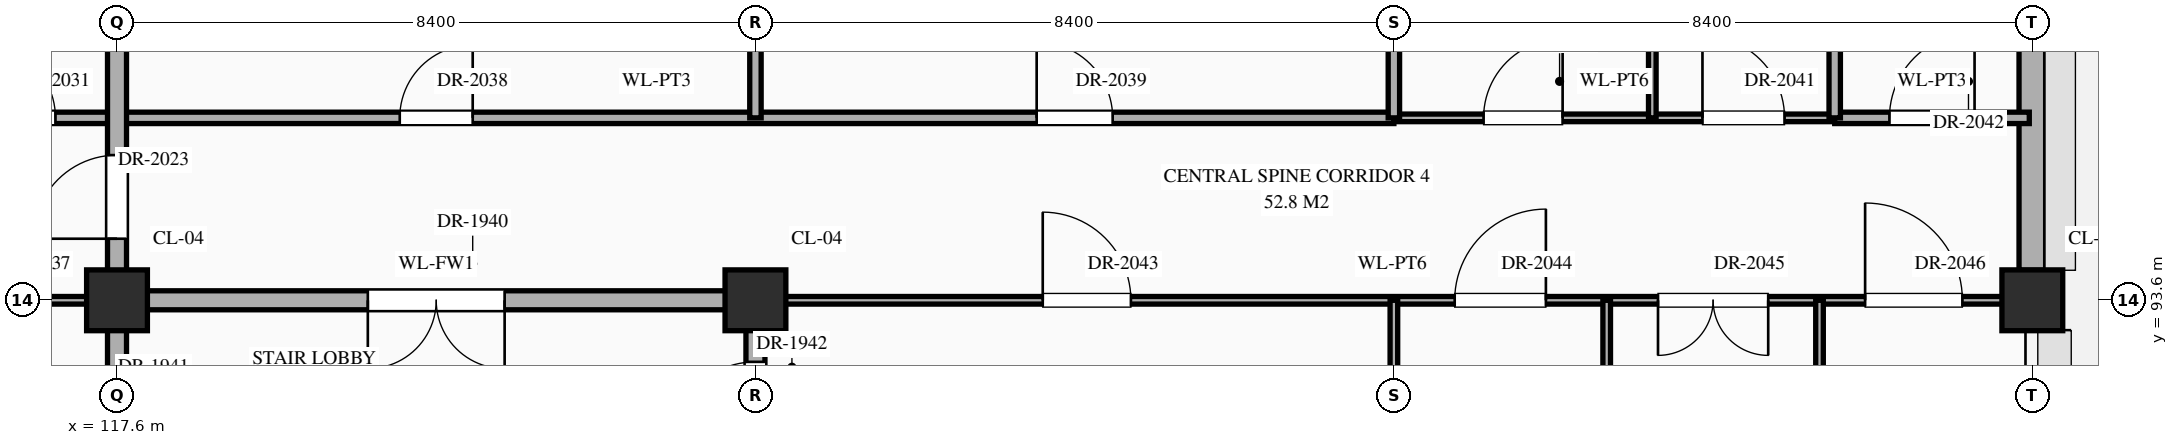
"""IFC4 building model, lengths in metres.
Left out: names, types, materials, properties, quantities, classifications, styles, units other than length and angle.
Written with IfcOpenShell. Run it as: python <this file> out.ifc"""

import sys

from ifc_helpers import new_model, si_unit, direction, frame, frame_2d, origin, origin_2d, place, context, subcontext, project, spatial, rectangle, extrude, element, fill, save


model = new_model("IFC4")
c1 = context("Model", 3, precision=1e-05, world=origin(), true_north=direction((0.0, 1.0)))
c2 = subcontext(c1, "Body", "Model", "MODEL_VIEW")
j1 = project(units=[si_unit("LENGTHUNIT", "METRE"), si_unit("PLANEANGLEUNIT", "RADIAN")], contexts=[c1])
p1 = place(None, origin())
s1 = spatial("IfcSite", under=j1, at=p1, CompositionType="ELEMENT")
p2 = place(p1, origin())
s2 = spatial("IfcBuilding", under=s1, at=p2, CompositionType="ELEMENT")
p3 = place(p2, frame((0.0, 0.0, 21.6)))
s3 = spatial("IfcBuildingStorey", under=s2, at=p3, CompositionType="ELEMENT", Elevation=21.6)
for number, where, z_axis, x_axis in (
    (1, (117.6, 93.6, 0.0), (0.0, 0.0, 1.0), (1.0, 0.0, 0.0)),
    (2, (126.0, 93.6, 0.0), (0.0, 0.0, 1.0), (1.0, 0.0, 0.0)),
    (3, (142.8, 93.6, 0.0), (0.0, 0.0, 1.0), (1.0, 0.0, 0.0)),
):
    element("IfcColumn", number, at=place(p3, frame(where, z_axis=z_axis, x_axis=x_axis)), inside=s3, PredefinedType="COLUMN", context=c2, shape_type="SweptSolid", body=[
        extrude(rectangle(XDim=0.8, YDim=0.8, at=origin_2d()), origin(), (0.0, 0.0, 1.0), 4.5),
    ])
p4 = place(p3, frame((142.8, 93.995, 0.0), z_axis=(0.0, 0.0, 1.0), x_axis=(0.0, 1.0, 0.0)))
e4 = element("IfcWall", 4, at=p4, inside=s3, PredefinedType="STANDARD", context=c2, shape_type="SweptSolid", body=[
    extrude(rectangle(XDim=6.41, YDim=0.35, at=frame_2d((3.205, 0.0))), origin(), (0.0, 0.0, 1.0), 3.59),
])
p5 = place(p4, frame((3.73, 0.0, 0.85)))
e5 = element("IfcOpeningElement", 5, at=p5, cuts=e4, PredefinedType="OPENING", context=c2, shape_type="SweptSolid", body=[
    extrude(rectangle(XDim=1.55, YDim=1.38, at=frame_2d((0.775, 0.69))), frame((0.0, 0.187, 0.0), z_axis=(0.0, -1.0, 0.0), x_axis=(1.0, 0.0, 0.0)), (0.0, 0.0, 1.0), 0.374),
])
p6 = place(p3, frame((109.2, 93.6, 0.0), z_axis=(0.0, 0.0, 1.0), x_axis=(1.0, 0.0, 0.0)))
e6 = element("IfcWall", 6, at=p6, inside=s3, PredefinedType="STANDARD", context=c2, shape_type="SweptSolid", body=[
    extrude(rectangle(XDim=8.4, YDim=0.1, at=frame_2d((4.2, 0.0))), origin(), (0.0, 0.0, 1.0), 3.39),
])
p7 = place(p6, frame((1.11, 0.0, 0.0)))
e7 = element("IfcOpeningElement", 7, at=p7, cuts=e6, PredefinedType="OPENING", context=c2, shape_type="SweptSolid", body=[
    extrude(rectangle(XDim=0.9, YDim=2.15, at=frame_2d((0.45, 1.075))), frame((0.0, 0.062, 0.0), z_axis=(0.0, -1.0, 0.0), x_axis=(1.0, 0.0, 0.0)), (0.0, 0.0, 1.0), 0.124),
])
p8 = place(p6, frame((3.77, 0.0, 0.0)))
e8 = element("IfcOpeningElement", 8, at=p8, cuts=e6, PredefinedType="OPENING", context=c2, shape_type="SweptSolid", body=[
    extrude(rectangle(XDim=0.86, YDim=2.1, at=frame_2d((0.43, 1.05))), frame((0.0, 0.062, 0.0), z_axis=(0.0, -1.0, 0.0), x_axis=(1.0, 0.0, 0.0)), (0.0, 0.0, 1.0), 0.124),
])
p9 = place(p6, frame((6.38, 0.0, 0.0)))
e9 = element("IfcOpeningElement", 9, at=p9, cuts=e6, PredefinedType="OPENING", context=c2, shape_type="SweptSolid", body=[
    extrude(rectangle(XDim=0.92, YDim=2.15, at=frame_2d((0.46, 1.075))), frame((0.0, 0.062, 0.0), z_axis=(0.0, -1.0, 0.0), x_axis=(1.0, 0.0, 0.0)), (0.0, 0.0, 1.0), 0.124),
])
p10 = place(p3, frame((117.6, 93.6, 0.0), z_axis=(0.0, 0.0, 1.0), x_axis=(1.0, 0.0, 0.0)))
e10 = element("IfcWall", 10, at=p10, inside=s3, PredefinedType="STANDARD", context=c2, shape_type="SweptSolid", body=[
    extrude(rectangle(XDim=8.4, YDim=0.25, at=frame_2d((4.2, 0.0))), origin(), (0.0, 0.0, 1.0), 3.39),
])
p11 = place(p10, frame((3.3, 0.0, 0.0)))
e11 = element("IfcOpeningElement", 11, at=p11, cuts=e10, PredefinedType="OPENING", context=c2, shape_type="SweptSolid", body=[
    extrude(rectangle(XDim=1.8, YDim=2.35, at=frame_2d((0.9, 1.175))), frame((0.0, 0.137, 0.0), z_axis=(0.0, -1.0, 0.0), x_axis=(1.0, 0.0, 0.0)), (0.0, 0.0, 1.0), 0.274),
])
p12 = place(p3, frame((126.0, 93.6, 0.0), z_axis=(0.0, 0.0, 1.0), x_axis=(1.0, 0.0, 0.0)))
e12 = element("IfcWall", 12, at=p12, inside=s3, PredefinedType="STANDARD", context=c2, shape_type="SweptSolid", body=[
    extrude(rectangle(XDim=16.76, YDim=0.1, at=frame_2d((8.38, 0.0))), origin(), (0.0, 0.0, 1.0), 3.19),
])
p13 = place(p12, frame((3.78, 0.0, 0.0)))
e13 = element("IfcOpeningElement", 13, at=p13, cuts=e12, PredefinedType="OPENING", context=c2, shape_type="SweptSolid", body=[
    extrude(rectangle(XDim=1.16, YDim=2.3, at=frame_2d((0.58, 1.15))), frame((0.0, 0.062, 0.0), z_axis=(0.0, -1.0, 0.0), x_axis=(1.0, 0.0, 0.0)), (0.0, 0.0, 1.0), 0.124),
])
p14 = place(p12, frame((9.2, 0.0, 0.0)))
e14 = element("IfcOpeningElement", 14, at=p14, cuts=e12, PredefinedType="OPENING", context=c2, shape_type="SweptSolid", body=[
    extrude(rectangle(XDim=1.2, YDim=2.35, at=frame_2d((0.6, 1.175))), frame((0.0, 0.062, 0.0), z_axis=(0.0, -1.0, 0.0), x_axis=(1.0, 0.0, 0.0)), (0.0, 0.0, 1.0), 0.124),
])
p15 = place(p12, frame((11.875, 0.0, 0.0)))
e15 = element("IfcOpeningElement", 15, at=p15, cuts=e12, PredefinedType="OPENING", context=c2, shape_type="SweptSolid", body=[
    extrude(rectangle(XDim=1.45, YDim=2.3, at=frame_2d((0.725, 1.15))), frame((0.0, 0.062, 0.0), z_axis=(0.0, -1.0, 0.0), x_axis=(1.0, 0.0, 0.0)), (0.0, 0.0, 1.0), 0.124),
])
p16 = place(p12, frame((14.6, 0.0, 0.0)))
e16 = element("IfcOpeningElement", 16, at=p16, cuts=e12, PredefinedType="OPENING", context=c2, shape_type="SweptSolid", body=[
    extrude(rectangle(XDim=1.28, YDim=2.35, at=frame_2d((0.64, 1.175))), frame((0.0, 0.062, 0.0), z_axis=(0.0, -1.0, 0.0), x_axis=(1.0, 0.0, 0.0)), (0.0, 0.0, 1.0), 0.124),
])
p17 = place(p3, frame((115.0, 96.0, 0.0), z_axis=(0.0, 0.0, 1.0), x_axis=(1.0, 0.0, 0.0)))
e17 = element("IfcWall", 17, at=p17, inside=s3, PredefinedType="STANDARD", context=c2, shape_type="SweptSolid", body=[
    extrude(rectangle(XDim=19.4, YDim=0.15, at=frame_2d((9.7, 0.0))), origin(), (0.0, 0.0, 1.0), 4.24),
])
p18 = place(p17, frame((0.81, 0.0, 0.0)))
e18 = element("IfcOpeningElement", 18, at=p18, cuts=e17, PredefinedType="OPENING", context=c2, shape_type="SweptSolid", body=[
    extrude(rectangle(XDim=0.98, YDim=2.35, at=frame_2d((0.49, 1.175))), frame((0.0, 0.087, 0.0), z_axis=(0.0, -1.0, 0.0), x_axis=(1.0, 0.0, 0.0)), (0.0, 0.0, 1.0), 0.174),
])
p19 = place(p17, frame((6.32, 0.0, 0.0)))
e19 = element("IfcOpeningElement", 19, at=p19, cuts=e17, PredefinedType="OPENING", context=c2, shape_type="SweptSolid", body=[
    extrude(rectangle(XDim=0.96, YDim=2.2, at=frame_2d((0.48, 1.1))), frame((0.0, 0.087, 0.0), z_axis=(0.0, -1.0, 0.0), x_axis=(1.0, 0.0, 0.0)), (0.0, 0.0, 1.0), 0.174),
])
p20 = place(p17, frame((14.7, 0.0, 0.0)))
e20 = element("IfcOpeningElement", 20, at=p20, cuts=e17, PredefinedType="OPENING", context=c2, shape_type="SweptSolid", body=[
    extrude(rectangle(XDim=1.0, YDim=2.25, at=frame_2d((0.5, 1.125))), frame((0.0, 0.087, 0.0), z_axis=(0.0, -1.0, 0.0), x_axis=(1.0, 0.0, 0.0)), (0.0, 0.0, 1.0), 0.174),
])
p21 = place(p3, frame((134.4, 96.0, 0.0), z_axis=(0.0, 0.0, 1.0), x_axis=(1.0, 0.0, 0.0)))
e21 = element("IfcWall", 21, at=p21, inside=s3, PredefinedType="STANDARD", context=c2, shape_type="SweptSolid", body=[
    extrude(rectangle(XDim=5.8, YDim=0.1, at=frame_2d((2.9, 0.0))), origin(), (0.0, 0.0, 1.0), 4.24),
])
p22 = place(p21, frame((1.18, 0.0, 0.0)))
e22 = element("IfcOpeningElement", 22, at=p22, cuts=e21, PredefinedType="OPENING", context=c2, shape_type="SweptSolid", body=[
    extrude(rectangle(XDim=1.04, YDim=2.2, at=frame_2d((0.52, 1.1))), frame((0.0, 0.062, 0.0), z_axis=(0.0, -1.0, 0.0), x_axis=(1.0, 0.0, 0.0)), (0.0, 0.0, 1.0), 0.124),
])
p23 = place(p21, frame((4.06, 0.0, 0.0)))
e23 = element("IfcOpeningElement", 23, at=p23, cuts=e21, PredefinedType="OPENING", context=c2, shape_type="SweptSolid", body=[
    extrude(rectangle(XDim=1.08, YDim=2.25, at=frame_2d((0.54, 1.125))), frame((0.0, 0.062, 0.0), z_axis=(0.0, -1.0, 0.0), x_axis=(1.0, 0.0, 0.0)), (0.0, 0.0, 1.0), 0.124),
])
p24 = place(p3, frame((140.2, 96.0, 0.0), z_axis=(0.0, 0.0, 1.0), x_axis=(1.0, 0.0, 0.0)))
e24 = element("IfcWall", 24, at=p24, inside=s3, PredefinedType="STANDARD", context=c2, shape_type="SweptSolid", body=[
    extrude(rectangle(XDim=2.56, YDim=0.15, at=frame_2d((1.28, 0.0))), origin(), (0.0, 0.0, 1.0), 4.24),
])
p25 = place(p24, frame((0.72, 0.0, 0.0)))
e25 = element("IfcOpeningElement", 25, at=p25, cuts=e24, PredefinedType="OPENING", context=c2, shape_type="SweptSolid", body=[
    extrude(rectangle(XDim=1.12, YDim=2.25, at=frame_2d((0.56, 1.125))), frame((0.0, 0.087, 0.0), z_axis=(0.0, -1.0, 0.0), x_axis=(1.0, 0.0, 0.0)), (0.0, 0.0, 1.0), 0.174),
])
p26 = place(p3, frame((117.6, 91.2, 0.0), z_axis=(0.0, 0.0, 1.0), x_axis=(0.0, 1.0, 0.0)))
e26 = element("IfcWall", 26, at=p26, inside=s3, PredefinedType="STANDARD", context=c2, shape_type="SweptSolid", body=[
    extrude(rectangle(XDim=13.2, YDim=0.25, at=frame_2d((6.6, 0.0))), origin(), (0.0, 0.0, 1.0), 3.49),
])
p27 = place(p26, frame((0.565, 0.0, 0.0)))
e27 = element("IfcOpeningElement", 27, at=p27, cuts=e26, PredefinedType="OPENING", context=c2, shape_type="SweptSolid", body=[
    extrude(rectangle(XDim=0.95, YDim=2.15, at=frame_2d((0.475, 1.075))), frame((0.0, 0.137, 0.0), z_axis=(0.0, -1.0, 0.0), x_axis=(1.0, 0.0, 0.0)), (0.0, 0.0, 1.0), 0.274),
])
p28 = place(p26, frame((10.41, 0.0, 0.0)))
e28 = element("IfcOpeningElement", 28, at=p28, cuts=e26, PredefinedType="OPENING", context=c2, shape_type="SweptSolid", body=[
    extrude(rectangle(XDim=1.1, YDim=2.2, at=frame_2d((0.55, 1.1))), frame((0.0, 0.137, 0.0), z_axis=(0.0, -1.0, 0.0), x_axis=(1.0, 0.0, 0.0)), (0.0, 0.0, 1.0), 0.274),
])
p29 = place(p26, frame((3.21, 0.0, 0.0)))
e29 = element("IfcOpeningElement", 29, at=p29, cuts=e26, PredefinedType="OPENING", context=c2, shape_type="SweptSolid", body=[
    extrude(rectangle(XDim=1.1, YDim=2.2, at=frame_2d((0.55, 1.1))), frame((0.0, 0.137, 0.0), z_axis=(0.0, -1.0, 0.0), x_axis=(1.0, 0.0, 0.0)), (0.0, 0.0, 1.0), 0.274),
])
p30 = place(p3, frame((126.0, 91.2, 0.0), z_axis=(0.0, 0.0, 1.0), x_axis=(0.0, 1.0, 0.0)))
e30 = element("IfcWall", 30, at=p30, inside=s3, PredefinedType="STANDARD", context=c2, shape_type="SweptSolid", body=[
    extrude(rectangle(XDim=2.4, YDim=0.25, at=frame_2d((1.2, 0.0))), origin(), (0.0, 0.0, 1.0), 3.49),
])
p31 = place(p30, frame((0.49, 0.0, 0.0)))
e31 = element("IfcOpeningElement", 31, at=p31, cuts=e30, PredefinedType="OPENING", context=c2, shape_type="SweptSolid", body=[
    extrude(rectangle(XDim=1.1, YDim=2.2, at=frame_2d((0.55, 1.1))), frame((0.0, 0.137, 0.0), z_axis=(0.0, -1.0, 0.0), x_axis=(1.0, 0.0, 0.0)), (0.0, 0.0, 1.0), 0.274),
])
p32 = place(p3, frame((126.0, 96.0, 0.0), z_axis=(0.0, 0.0, 1.0), x_axis=(0.0, 1.0, 0.0)))
e32 = element("IfcWall", 32, at=p32, inside=s3, PredefinedType="STANDARD", context=c2, shape_type="SweptSolid", body=[
    extrude(rectangle(XDim=4.8, YDim=0.15, at=frame_2d((2.4, 0.0))), origin(), (0.0, 0.0, 1.0), 3.49),
])
p33 = place(p3, frame((134.4, 86.4, 0.0), z_axis=(0.0, 0.0, 1.0), x_axis=(0.0, 1.0, 0.0)))
e33 = element("IfcWall", 33, at=p33, inside=s3, PredefinedType="STANDARD", context=c2, shape_type="SweptSolid", body=[
    extrude(rectangle(XDim=7.2, YDim=0.1, at=frame_2d((3.6, 0.0))), origin(), (0.0, 0.0, 1.0), 4.24),
])
p34 = place(p3, frame((134.4, 96.0, 0.0), z_axis=(0.0, 0.0, 1.0), x_axis=(0.0, 1.0, 0.0)))
e34 = element("IfcWall", 34, at=p34, inside=s3, PredefinedType="STANDARD", context=c2, shape_type="SweptSolid", body=[
    extrude(rectangle(XDim=4.8, YDim=0.15, at=frame_2d((2.4, 0.0))), origin(), (0.0, 0.0, 1.0), 4.24),
])
p35 = place(p3, frame((137.2, 86.4, 0.0), z_axis=(0.0, 0.0, 1.0), x_axis=(0.0, 1.0, 0.0)))
e35 = element("IfcWall", 35, at=p35, inside=s3, PredefinedType="STANDARD", context=c2, shape_type="SweptSolid", body=[
    extrude(rectangle(XDim=7.2, YDim=0.1, at=frame_2d((3.6, 0.0))), origin(), (0.0, 0.0, 1.0), 4.24),
])
p36 = place(p35, frame((2.98, 0.0, 0.0)))
e36 = element("IfcOpeningElement", 36, at=p36, cuts=e35, PredefinedType="OPENING", context=c2, shape_type="SweptSolid", body=[
    extrude(rectangle(XDim=1.24, YDim=2.3, at=frame_2d((0.62, 1.15))), frame((0.0, 0.062, 0.0), z_axis=(0.0, -1.0, 0.0), x_axis=(1.0, 0.0, 0.0)), (0.0, 0.0, 1.0), 0.124),
])
p37 = place(p3, frame((137.8, 96.0, 0.0), z_axis=(0.0, 0.0, 1.0), x_axis=(0.0, 1.0, 0.0)))
e37 = element("IfcWall", 37, at=p37, inside=s3, PredefinedType="STANDARD", context=c2, shape_type="SweptSolid", body=[
    extrude(rectangle(XDim=4.8, YDim=0.1, at=frame_2d((2.4, 0.0))), origin(), (0.0, 0.0, 1.0), 4.24),
])
p38 = place(p37, frame((1.92, 0.0, 0.0)))
e38 = element("IfcOpeningElement", 38, at=p38, cuts=e37, PredefinedType="OPENING", context=c2, shape_type="SweptSolid", body=[
    extrude(rectangle(XDim=0.96, YDim=2.2, at=frame_2d((0.48, 1.1))), frame((0.0, 0.062, 0.0), z_axis=(0.0, -1.0, 0.0), x_axis=(1.0, 0.0, 0.0)), (0.0, 0.0, 1.0), 0.124),
])
p39 = place(p3, frame((140.0, 86.4, 0.0), z_axis=(0.0, 0.0, 1.0), x_axis=(0.0, 1.0, 0.0)))
e39 = element("IfcWall", 39, at=p39, inside=s3, PredefinedType="STANDARD", context=c2, shape_type="SweptSolid", body=[
    extrude(rectangle(XDim=7.2, YDim=0.1, at=frame_2d((3.6, 0.0))), origin(), (0.0, 0.0, 1.0), 4.24),
])
p40 = place(p39, frame((3.13, 0.0, 0.0)))
e40 = element("IfcOpeningElement", 40, at=p40, cuts=e39, PredefinedType="OPENING", context=c2, shape_type="SweptSolid", body=[
    extrude(rectangle(XDim=0.94, YDim=2.3, at=frame_2d((0.47, 1.15))), frame((0.0, 0.062, 0.0), z_axis=(0.0, -1.0, 0.0), x_axis=(1.0, 0.0, 0.0)), (0.0, 0.0, 1.0), 0.124),
])
p41 = place(p3, frame((140.2, 96.0, 0.0), z_axis=(0.0, 0.0, 1.0), x_axis=(0.0, 1.0, 0.0)))
e41 = element("IfcWall", 41, at=p41, inside=s3, PredefinedType="STANDARD", context=c2, shape_type="SweptSolid", body=[
    extrude(rectangle(XDim=4.8, YDim=0.15, at=frame_2d((2.4, 0.0))), origin(), (0.0, 0.0, 1.0), 4.24),
])
p42 = place(p41, frame((1.9, 0.0, 0.0)))
e42 = element("IfcOpeningElement", 42, at=p42, cuts=e41, PredefinedType="OPENING", context=c2, shape_type="SweptSolid", body=[
    extrude(rectangle(XDim=1.0, YDim=2.25, at=frame_2d((0.5, 1.125))), frame((0.0, 0.087, 0.0), z_axis=(0.0, -1.0, 0.0), x_axis=(1.0, 0.0, 0.0)), (0.0, 0.0, 1.0), 0.174),
])
p43 = place(p11, frame((1.8, 0.0, 0.0), z_axis=(0.0, 0.0, 1.0), x_axis=(-1.0, 0.0, 0.0)))
e43 = element("IfcDoor", 43, at=p43, inside=s3, OperationType="DOUBLE_DOOR_SINGLE_SWING", PredefinedType="DOOR", context=c2, shape_type="SweptSolid", body=[
    extrude(rectangle(XDim=1.8, YDim=2.35, at=frame_2d((0.9, 1.175))), frame((0.0, 0.025, 0.0), z_axis=(0.0, -1.0, 0.0), x_axis=(1.0, 0.0, 0.0)), (0.0, 0.0, 1.0), 0.05),
])
fill(e11, e43)
p44 = place(p31, origin())
e44 = element("IfcDoor", 44, at=p44, inside=s3, OperationType="SINGLE_SWING_LEFT", PredefinedType="DOOR", context=c2, shape_type="SweptSolid", body=[
    extrude(rectangle(XDim=1.1, YDim=2.2, at=frame_2d((0.55, 1.1))), frame((0.0, 0.025, 0.0), z_axis=(0.0, -1.0, 0.0), x_axis=(1.0, 0.0, 0.0)), (0.0, 0.0, 1.0), 0.05),
])
fill(e31, e44)
p45 = place(p29, origin())
e45 = element("IfcDoor", 45, at=p45, inside=s3, OperationType="SINGLE_SWING_LEFT", PredefinedType="DOOR", context=c2, shape_type="SweptSolid", body=[
    extrude(rectangle(XDim=1.1, YDim=2.2, at=frame_2d((0.55, 1.1))), frame((0.0, 0.025, 0.0), z_axis=(0.0, -1.0, 0.0), x_axis=(1.0, 0.0, 0.0)), (0.0, 0.0, 1.0), 0.05),
])
fill(e29, e45)
p46 = place(p18, origin())
e46 = element("IfcDoor", 46, at=p46, inside=s3, OperationType="SINGLE_SWING_LEFT", PredefinedType="DOOR", context=c2, shape_type="SweptSolid", body=[
    extrude(rectangle(XDim=0.98, YDim=2.35, at=frame_2d((0.49, 1.175))), frame((0.0, 0.025, 0.0), z_axis=(0.0, -1.0, 0.0), x_axis=(1.0, 0.0, 0.0)), (0.0, 0.0, 1.0), 0.05),
])
fill(e18, e46)
p47 = place(p19, origin())
e47 = element("IfcDoor", 47, at=p47, inside=s3, OperationType="SINGLE_SWING_RIGHT", PredefinedType="DOOR", context=c2, shape_type="SweptSolid", body=[
    extrude(rectangle(XDim=0.96, YDim=2.2, at=frame_2d((0.48, 1.1))), frame((0.0, 0.025, 0.0), z_axis=(0.0, -1.0, 0.0), x_axis=(1.0, 0.0, 0.0)), (0.0, 0.0, 1.0), 0.05),
])
fill(e19, e47)
p48 = place(p20, origin())
e48 = element("IfcDoor", 48, at=p48, inside=s3, OperationType="SINGLE_SWING_LEFT", PredefinedType="DOOR", context=c2, shape_type="SweptSolid", body=[
    extrude(rectangle(XDim=1.0, YDim=2.25, at=frame_2d((0.5, 1.125))), frame((0.0, 0.025, 0.0), z_axis=(0.0, -1.0, 0.0), x_axis=(1.0, 0.0, 0.0)), (0.0, 0.0, 1.0), 0.05),
])
fill(e20, e48)
p49 = place(p22, origin())
e49 = element("IfcDoor", 49, at=p49, inside=s3, OperationType="SINGLE_SWING_RIGHT", PredefinedType="DOOR", context=c2, shape_type="SweptSolid", body=[
    extrude(rectangle(XDim=1.04, YDim=2.2, at=frame_2d((0.52, 1.1))), frame((0.0, 0.025, 0.0), z_axis=(0.0, -1.0, 0.0), x_axis=(1.0, 0.0, 0.0)), (0.0, 0.0, 1.0), 0.05),
])
fill(e22, e49)
p50 = place(p23, origin())
e50 = element("IfcDoor", 50, at=p50, inside=s3, OperationType="SINGLE_SWING_LEFT", PredefinedType="DOOR", context=c2, shape_type="SweptSolid", body=[
    extrude(rectangle(XDim=1.08, YDim=2.25, at=frame_2d((0.54, 1.125))), frame((0.0, 0.025, 0.0), z_axis=(0.0, -1.0, 0.0), x_axis=(1.0, 0.0, 0.0)), (0.0, 0.0, 1.0), 0.05),
])
fill(e23, e50)
p51 = place(p25, origin())
e51 = element("IfcDoor", 51, at=p51, inside=s3, OperationType="SINGLE_SWING_RIGHT", PredefinedType="DOOR", context=c2, shape_type="SweptSolid", body=[
    extrude(rectangle(XDim=1.12, YDim=2.25, at=frame_2d((0.56, 1.125))), frame((0.0, 0.025, 0.0), z_axis=(0.0, -1.0, 0.0), x_axis=(1.0, 0.0, 0.0)), (0.0, 0.0, 1.0), 0.05),
])
fill(e25, e51)
p52 = place(p13, origin())
e52 = element("IfcDoor", 52, at=p52, inside=s3, OperationType="SINGLE_SWING_LEFT", PredefinedType="DOOR", context=c2, shape_type="SweptSolid", body=[
    extrude(rectangle(XDim=1.16, YDim=2.3, at=frame_2d((0.58, 1.15))), frame((0.0, 0.025, 0.0), z_axis=(0.0, -1.0, 0.0), x_axis=(1.0, 0.0, 0.0)), (0.0, 0.0, 1.0), 0.05),
])
fill(e13, e52)
p53 = place(p14, origin())
e53 = element("IfcDoor", 53, at=p53, inside=s3, OperationType="SINGLE_SWING_RIGHT", PredefinedType="DOOR", context=c2, shape_type="SweptSolid", body=[
    extrude(rectangle(XDim=1.2, YDim=2.35, at=frame_2d((0.6, 1.175))), frame((0.0, 0.025, 0.0), z_axis=(0.0, -1.0, 0.0), x_axis=(1.0, 0.0, 0.0)), (0.0, 0.0, 1.0), 0.05),
])
fill(e14, e53)
p54 = place(p15, frame((1.45, 0.0, 0.0), z_axis=(0.0, 0.0, 1.0), x_axis=(-1.0, 0.0, 0.0)))
e54 = element("IfcDoor", 54, at=p54, inside=s3, OperationType="DOUBLE_DOOR_SINGLE_SWING", PredefinedType="DOOR", context=c2, shape_type="SweptSolid", body=[
    extrude(rectangle(XDim=1.45, YDim=2.3, at=frame_2d((0.725, 1.15))), frame((0.0, 0.025, 0.0), z_axis=(0.0, -1.0, 0.0), x_axis=(1.0, 0.0, 0.0)), (0.0, 0.0, 1.0), 0.05),
])
fill(e15, e54)
p55 = place(p16, origin())
e55 = element("IfcDoor", 55, at=p55, inside=s3, OperationType="SINGLE_SWING_LEFT", PredefinedType="DOOR", context=c2, shape_type="SweptSolid", body=[
    extrude(rectangle(XDim=1.28, YDim=2.35, at=frame_2d((0.64, 1.175))), frame((0.0, 0.025, 0.0), z_axis=(0.0, -1.0, 0.0), x_axis=(1.0, 0.0, 0.0)), (0.0, 0.0, 1.0), 0.05),
])
fill(e16, e55)
save(model, sys.argv[1])
